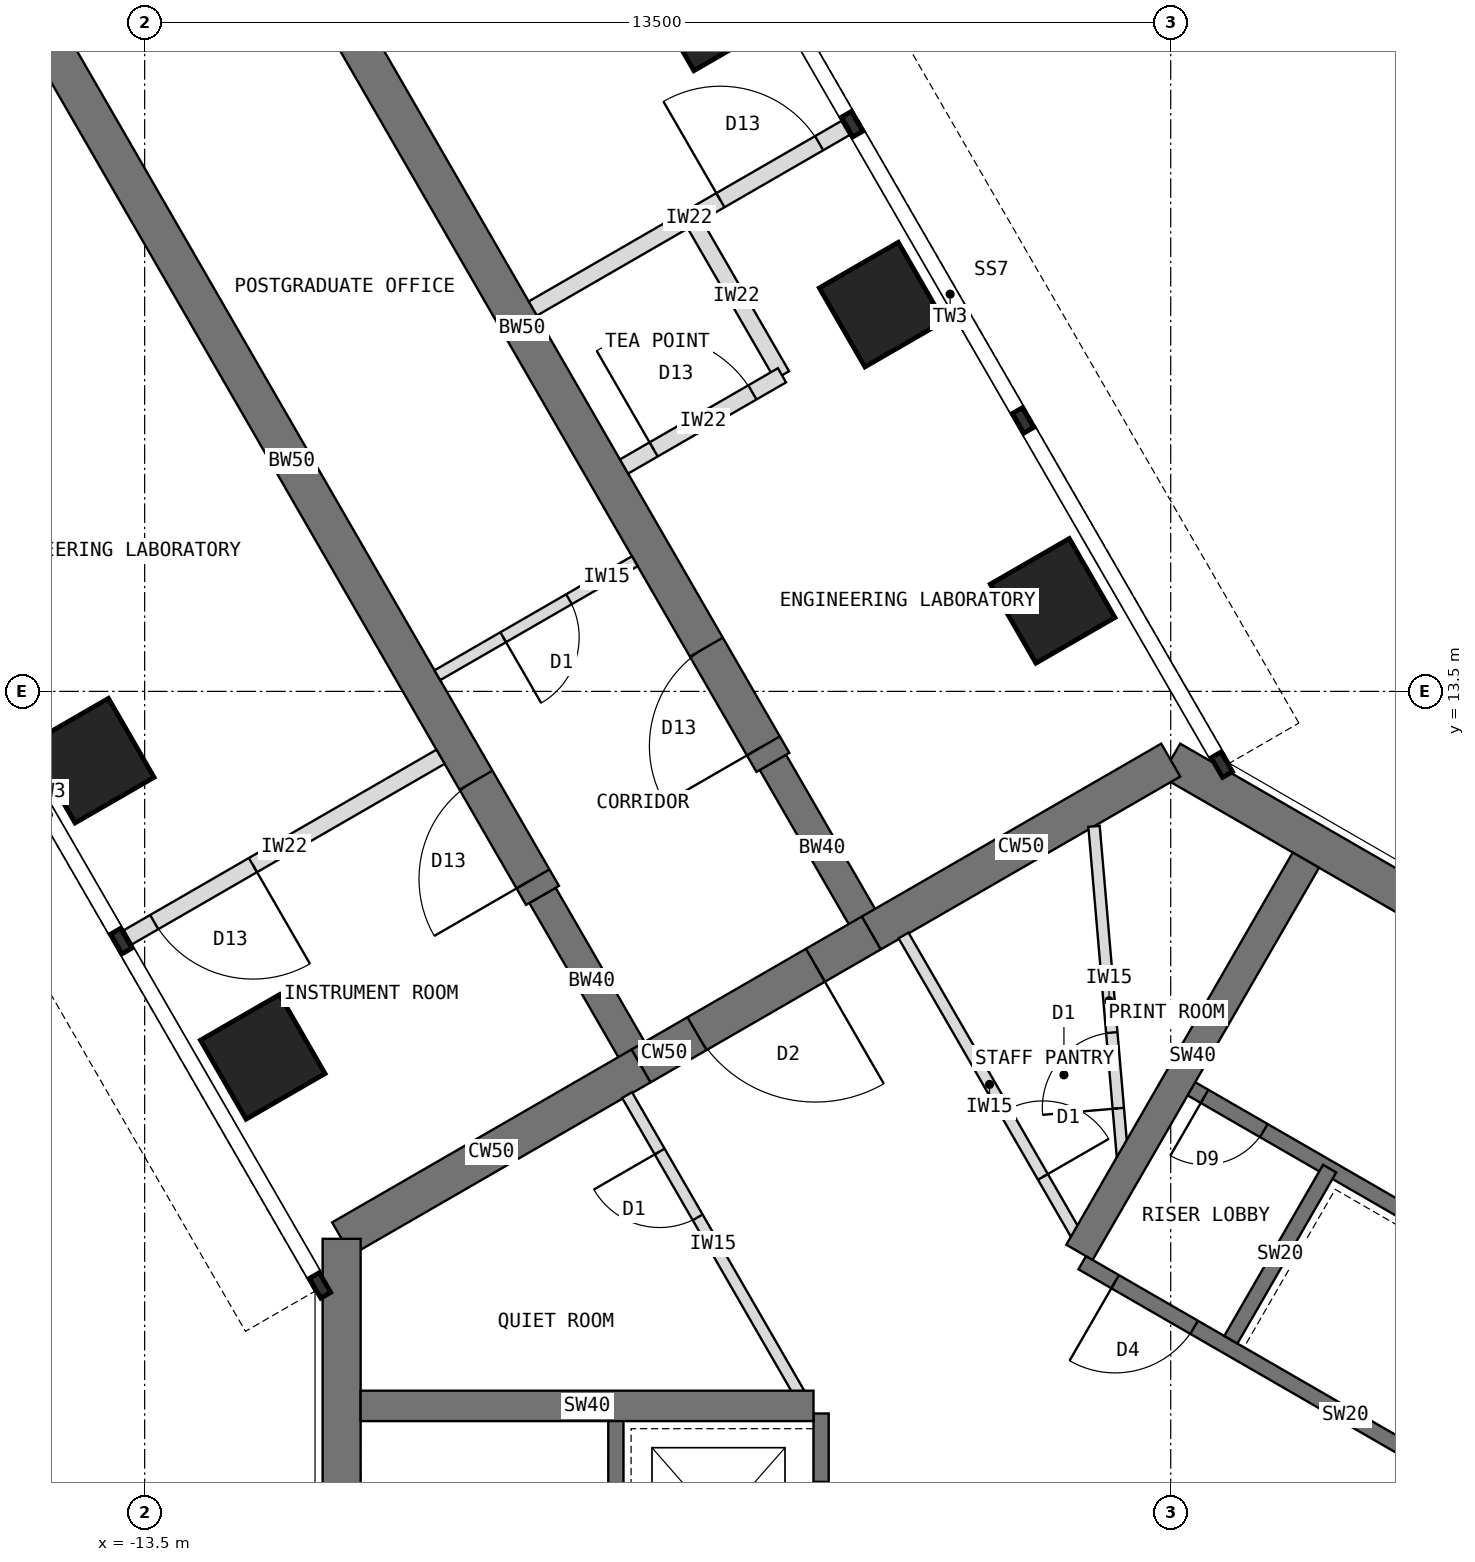
"""IFC4 building model, lengths in metres.
Left out: names, types, materials, properties, quantities, classifications, styles, units other than length and angle.
Written with IfcOpenShell. Run it as: python <this file> out.ifc"""

import sys

from ifc_helpers import new_model, si_unit, direction, frame, frame_2d, origin, origin_2d, place, context, subcontext, project, spatial, rectangle, extrude, element, fill, save


model = new_model("IFC4")
c1 = context("Model", 3, precision=1e-05, world=origin(), true_north=direction((0.0, 1.0)))
c2 = subcontext(c1, "Body", "Model", "MODEL_VIEW")
j1 = project(units=[si_unit("LENGTHUNIT", "METRE"), si_unit("PLANEANGLEUNIT", "RADIAN")], contexts=[c1])
p1 = place(None, origin())
s1 = spatial("IfcSite", under=j1, at=p1, CompositionType="ELEMENT")
p2 = place(p1, origin())
s2 = spatial("IfcBuilding", under=s1, at=p2, CompositionType="ELEMENT")
p3 = place(p2, frame((0.0, 0.0, 186.5)))
s3 = spatial("IfcBuildingStorey", under=s2, at=p3, CompositionType="ELEMENT", Elevation=186.5)
p4 = place(p3, frame((10.908, 6.298, 0.0), z_axis=(0.0, 0.0, 1.0), x_axis=(-0.866021940709, 0.500005998175, 0.0)))
e1 = element("IfcWall", 1, at=p4, inside=s3, PredefinedType="SHEAR", context=c2, shape_type="SweptSolid", body=[
    extrude(rectangle(XDim=12.596, YDim=0.5, at=frame_2d((6.298, 0.0))), origin(), (0.0, 0.0, 1.0), 4.0),
])
p5 = place(p3, frame((0.0, 12.596, 0.0), z_axis=(0.0, 0.0, 1.0), x_axis=(-0.866011268655, -0.500024481964, 0.0)))
e2 = element("IfcWall", 2, at=p5, inside=s3, PredefinedType="SHEAR", context=c2, shape_type="SweptSolid", body=[
    extrude(rectangle(XDim=4.548, YDim=0.5, at=frame_2d((2.274, 0.0))), origin(), (0.0, 0.0, 1.0), 4.0),
])
p6 = place(p3, frame((-3.939, 10.322, 0.0), z_axis=(0.0, 0.0, 1.0), x_axis=(-0.866019471182, -0.500010275428, 0.0)))
e3 = element("IfcWall", 3, at=p6, inside=s3, PredefinedType="SHEAR", context=c2, shape_type="SweptSolid", body=[
    extrude(rectangle(XDim=3.5, YDim=0.5, at=frame_2d((1.75, 0.0))), origin(), (0.0, 0.0, 1.0), 4.0),
])
p7 = place(p6, frame((0.85, 0.0, 0.0)))
e4 = element("IfcOpeningElement", 4, at=p7, cuts=e3, PredefinedType="OPENING", context=c2, shape_type="SweptSolid", body=[
    extrude(rectangle(XDim=1.8, YDim=2.1, at=frame_2d((0.9, 1.05))), frame((0.0, 0.26, 0.0), z_axis=(0.0, -1.0, 0.0), x_axis=(1.0, 0.0, 0.0)), (0.0, 0.0, 1.0), 0.52),
])
p8 = place(p3, frame((-6.97, 8.572, 0.0), z_axis=(0.0, 0.0, 1.0), x_axis=(-0.866034513004, -0.499984222037, 0.0)))
e5 = element("IfcWall", 5, at=p8, inside=s3, PredefinedType="SHEAR", context=c2, shape_type="SweptSolid", body=[
    extrude(rectangle(XDim=4.548, YDim=0.5, at=frame_2d((2.274, 0.0))), origin(), (0.0, 0.0, 1.0), 4.0),
])
p9 = place(p3, frame((-10.908, 6.298, 0.0), z_axis=(0.0, 0.0, 1.0), x_axis=(0.0, -1.0, 0.0)))
e6 = element("IfcWall", 6, at=p9, inside=s3, PredefinedType="SHEAR", context=c2, shape_type="SweptSolid", body=[
    extrude(rectangle(XDim=12.596, YDim=0.5, at=frame_2d((6.298, 0.0))), origin(), (0.0, 0.0, 1.0), 4.0),
])
p10 = place(p3, frame((-6.97, 8.572, 0.0), z_axis=(0.0, 0.0, 1.0), x_axis=(-0.499988811324, 0.866031863473, 0.0)))
e7 = element("IfcWall", 7, at=p10, inside=s3, PredefinedType="SHEAR", context=c2, shape_type="SweptSolid", body=[
    extrude(rectangle(XDim=2.592, YDim=0.4, at=frame_2d((1.296, 0.0))), origin(), (0.0, 0.0, 1.0), 4.0),
])
p11 = place(p3, frame((-8.266, 10.816, 0.0), z_axis=(0.0, 0.0, 1.0), x_axis=(-0.499996231654, 0.866027579429, 0.0)))
e8 = element("IfcWall", 8, at=p11, inside=s3, PredefinedType="SHEAR", context=c2, shape_type="SweptSolid", body=[
    extrude(rectangle(XDim=13.2, YDim=0.5, at=frame_2d((6.6, 0.0))), origin(), (0.0, 0.0, 1.0), 4.0),
])
p12 = place(p11, frame((0.25, 0.0, 0.0)))
e9 = element("IfcOpeningElement", 9, at=p12, cuts=e8, PredefinedType="OPENING", context=c2, shape_type="SweptSolid", body=[
    extrude(rectangle(XDim=1.5, YDim=2.1, at=frame_2d((0.75, 1.05))), frame((0.0, 0.26, 0.0), z_axis=(0.0, -1.0, 0.0), x_axis=(1.0, 0.0, 0.0)), (0.0, 0.0, 1.0), 0.52),
])
p13 = place(p3, frame((-3.939, 10.322, 0.0), z_axis=(0.0, 0.0, 1.0), x_axis=(-0.499918158782, 0.866072649678, 0.0)))
e10 = element("IfcWall", 10, at=p13, inside=s3, PredefinedType="SHEAR", context=c2, shape_type="SweptSolid", body=[
    extrude(rectangle(XDim=2.592, YDim=0.4, at=frame_2d((1.296, 0.0))), origin(), (0.0, 0.0, 1.0), 4.0),
])
p14 = place(p3, frame((-5.234, 12.566, 0.0), z_axis=(0.0, 0.0, 1.0), x_axis=(-0.500010103361, 0.866019570528, 0.0)))
e11 = element("IfcWall", 11, at=p14, inside=s3, PredefinedType="SHEAR", context=c2, shape_type="SweptSolid", body=[
    extrude(rectangle(XDim=13.2, YDim=0.5, at=frame_2d((6.6, 0.0))), origin(), (0.0, 0.0, 1.0), 4.0),
])
p15 = place(p14, frame((0.25, 0.0, 0.0)))
e12 = element("IfcOpeningElement", 12, at=p15, cuts=e11, PredefinedType="OPENING", context=c2, shape_type="SweptSolid", body=[
    extrude(rectangle(XDim=1.5, YDim=2.1, at=frame_2d((0.75, 1.05))), frame((0.0, 0.26, 0.0), z_axis=(0.0, -1.0, 0.0), x_axis=(1.0, 0.0, 0.0)), (0.0, 0.0, 1.0), 0.52),
])
for number, where, z_axis, x_axis in (
    (13, (-11.946, 8.691, 0.0), (0.0, 0.0, 1.0), (0.866, 0.5, 0.0)),
    (14, (-1.554, 14.691, 0.0), (0.0, 0.0, 1.0), (0.866, 0.5, 0.0)),
    (15, (-14.196, 12.588, 0.0), (0.0, 0.0, 1.0), (0.866, 0.5, 0.0)),
    (16, (-3.804, 18.588, 0.0), (0.0, 0.0, 1.0), (0.866, 0.5, 0.0)),
    (17, (-6.054, 22.486, 0.0), (0.0, 0.0, 1.0), (0.866, 0.5, 0.0)),
):
    element("IfcColumn", number, at=place(p3, frame(where, z_axis=z_axis, x_axis=x_axis)), inside=s3, PredefinedType="COLUMN", context=c2, shape_type="SweptSolid", body=[
        extrude(rectangle(XDim=1.2, YDim=1.2, at=origin_2d()), origin(), (0.0, 0.0, 1.0), 4.0),
    ])
p16 = place(p3, frame((5.764, 1.984, 0.0), z_axis=(0.0, 0.0, 1.0), x_axis=(-0.866026010844, 0.49999894854, 0.0)))
e18 = element("IfcWall", 18, at=p16, inside=s3, PredefinedType="SHEAR", context=c2, shape_type="SweptSolid", body=[
    extrude(rectangle(XDim=8.0, YDim=0.2, at=frame_2d((4.0, 0.0))), origin(), (0.0, 0.0, 1.0), 4.0),
])
p17 = place(p16, frame((6.3, 0.0, 0.0)))
e19 = element("IfcOpeningElement", 19, at=p17, cuts=e18, PredefinedType="OPENING", context=c2, shape_type="SweptSolid", body=[
    extrude(rectangle(XDim=1.2, YDim=2.1, at=frame_2d((0.6, 1.05))), frame((0.0, 0.11, 0.0), z_axis=(0.0, -1.0, 0.0), x_axis=(1.0, 0.0, 0.0)), (0.0, 0.0, 1.0), 0.22),
])
p18 = place(p3, frame((0.791, 4.97, 0.0), z_axis=(0.0, 0.0, 1.0), x_axis=(0.499936506574, 0.866062058628, 0.0)))
e20 = element("IfcWall", 20, at=p18, inside=s3, PredefinedType="SHEAR", context=c2, shape_type="SweptSolid", body=[
    extrude(rectangle(XDim=2.6, YDim=0.2, at=frame_2d((1.3, 0.0))), origin(), (0.0, 0.0, 1.0), 4.0),
])
p19 = place(p3, frame((7.114, 4.322, 0.0), z_axis=(0.0, 0.0, 1.0), x_axis=(-0.866026010844, 0.49999894854, 0.0)))
e21 = element("IfcWall", 21, at=p19, inside=s3, PredefinedType="SHEAR", context=c2, shape_type="SweptSolid", body=[
    extrude(rectangle(XDim=8.0, YDim=0.2, at=frame_2d((4.0, 0.0))), origin(), (0.0, 0.0, 1.0), 4.0),
])
p20 = place(p19, frame((6.8, 0.0, 0.0)))
e22 = element("IfcOpeningElement", 22, at=p20, cuts=e21, PredefinedType="OPENING", context=c2, shape_type="SweptSolid", body=[
    extrude(rectangle(XDim=0.9, YDim=2.1, at=frame_2d((0.45, 1.05))), frame((0.0, 0.11, 0.0), z_axis=(0.0, -1.0, 0.0), x_axis=(1.0, 0.0, 0.0)), (0.0, 0.0, 1.0), 0.22),
])
p21 = place(p3, frame((-1.201, 6.12, 0.0), z_axis=(0.0, 0.0, 1.0), x_axis=(0.500021575205, 0.866012946976, 0.0)))
e23 = element("IfcWall", 23, at=p21, inside=s3, PredefinedType="SHEAR", context=c2, shape_type="SweptSolid", body=[
    extrude(rectangle(XDim=5.958, YDim=0.4, at=frame_2d((2.979, 0.0))), origin(), (0.0, 0.0, 1.0), 4.0),
])
p22 = place(p3, frame((-4.6, 4.0, 0.0), z_axis=(0.0, 0.0, 1.0), x_axis=(0.0, -1.0, 0.0)))
e24 = element("IfcWall", 24, at=p22, inside=s3, PredefinedType="SHEAR", context=c2, shape_type="SweptSolid", body=[
    extrude(rectangle(XDim=8.0, YDim=0.2, at=frame_2d((4.0, 0.0))), origin(), (0.0, 0.0, 1.0), 4.0),
])
p23 = place(p22, frame((6.3, 0.0, 0.0)))
e25 = element("IfcOpeningElement", 25, at=p23, cuts=e24, PredefinedType="OPENING", context=c2, shape_type="SweptSolid", body=[
    extrude(rectangle(XDim=1.2, YDim=2.1, at=frame_2d((0.6, 1.05))), frame((0.0, 0.11, 0.0), z_axis=(0.0, -1.0, 0.0), x_axis=(1.0, 0.0, 0.0)), (0.0, 0.0, 1.0), 0.22),
])
p24 = place(p22, frame((0.9, 0.0, 0.0)))
e26 = element("IfcOpeningElement", 26, at=p24, cuts=e24, PredefinedType="OPENING", context=c2, shape_type="SweptSolid", body=[
    extrude(rectangle(XDim=1.1, YDim=2.2, at=frame_2d((0.55, 1.1))), frame((0.0, 0.11, 0.0), z_axis=(0.0, -1.0, 0.0), x_axis=(1.0, 0.0, 0.0)), (0.0, 0.0, 1.0), 0.22),
])
p25 = place(p3, frame((-7.3, 4.0, 0.0), z_axis=(0.0, 0.0, 1.0), x_axis=(0.0, -1.0, 0.0)))
e27 = element("IfcWall", 27, at=p25, inside=s3, PredefinedType="SHEAR", context=c2, shape_type="SweptSolid", body=[
    extrude(rectangle(XDim=8.0, YDim=0.2, at=frame_2d((4.0, 0.0))), origin(), (0.0, 0.0, 1.0), 4.0),
])
p26 = place(p25, frame((6.7, 0.0, 0.0)))
e28 = element("IfcOpeningElement", 28, at=p26, cuts=e27, PredefinedType="OPENING", context=c2, shape_type="SweptSolid", body=[
    extrude(rectangle(XDim=1.1, YDim=2.1, at=frame_2d((0.55, 1.05))), frame((0.0, 0.11, 0.0), z_axis=(0.0, -1.0, 0.0), x_axis=(1.0, 0.0, 0.0)), (0.0, 0.0, 1.0), 0.22),
])
p27 = place(p3, frame((-4.7, 4.1, 0.0), z_axis=(0.0, 0.0, 1.0), x_axis=(-1.0, 0.0, 0.0)))
e29 = element("IfcWall", 29, at=p27, inside=s3, PredefinedType="SHEAR", context=c2, shape_type="SweptSolid", body=[
    extrude(rectangle(XDim=5.958, YDim=0.4, at=frame_2d((2.979, 0.0))), origin(), (0.0, 0.0, 1.0), 4.0),
])
p28 = place(p3, frame((-9.607, 12.64, 0.0), z_axis=(0.0, 0.0, 1.0), x_axis=(-0.866033238375, -0.499986429846, 0.0)))
e30 = element("IfcWall", 30, at=p28, inside=s3, PredefinedType="PARTITIONING", context=c2, shape_type="SweptSolid", body=[
    extrude(rectangle(XDim=4.75, YDim=0.215, at=frame_2d((2.375, 0.0))), origin(), (0.0, 0.0, 1.0), 3.8),
])
p29 = place(p28, frame((2.85, 0.0, 0.0)))
e31 = element("IfcOpeningElement", 31, at=p29, cuts=e30, PredefinedType="OPENING", context=c2, shape_type="SweptSolid", body=[
    extrude(rectangle(XDim=1.5, YDim=2.1, at=frame_2d((0.75, 1.05))), frame((0.0, 0.117, 0.0), z_axis=(0.0, -1.0, 0.0), x_axis=(1.0, 0.0, 0.0)), (0.0, 0.0, 1.0), 0.235),
])
p30 = place(p3, frame((-8.393, 18.537, 0.0), z_axis=(0.0, 0.0, 1.0), x_axis=(0.866033238375, 0.499986429846, 0.0)))
e32 = element("IfcWall", 32, at=p30, inside=s3, PredefinedType="PARTITIONING", context=c2, shape_type="SweptSolid", body=[
    extrude(rectangle(XDim=4.75, YDim=0.215, at=frame_2d((2.375, 0.0))), origin(), (0.0, 0.0, 1.0), 3.8),
])
p31 = place(p30, frame((2.85, 0.0, 0.0)))
e33 = element("IfcOpeningElement", 33, at=p31, cuts=e32, PredefinedType="OPENING", context=c2, shape_type="SweptSolid", body=[
    extrude(rectangle(XDim=1.5, YDim=2.1, at=frame_2d((0.75, 1.05))), frame((0.0, 0.117, 0.0), z_axis=(0.0, -1.0, 0.0), x_axis=(1.0, 0.0, 0.0)), (0.0, 0.0, 1.0), 0.235),
])
p32 = place(p3, frame((-5.115, 17.658, 0.0), z_axis=(0.0, 0.0, 1.0), x_axis=(-0.499957262057, 0.866050077142, 0.0)))
e34 = element("IfcWall", 34, at=p32, inside=s3, PredefinedType="PARTITIONING", context=c2, shape_type="SweptSolid", body=[
    extrude(rectangle(XDim=2.4, YDim=0.215, at=frame_2d((1.2, 0.0))), origin(), (0.0, 0.0, 1.0), 3.8),
])
p33 = place(p3, frame((-7.193, 16.458, 0.0), z_axis=(0.0, 0.0, 1.0), x_axis=(0.866024647952, 0.500001309137, 0.0)))
e35 = element("IfcWall", 35, at=p33, inside=s3, PredefinedType="PARTITIONING", context=c2, shape_type="SweptSolid", body=[
    extrude(rectangle(XDim=2.4, YDim=0.215, at=frame_2d((1.2, 0.0))), origin(), (0.0, 0.0, 1.0), 3.8),
])
p34 = place(p33, frame((0.45, 0.0, 0.0)))
e36 = element("IfcOpeningElement", 36, at=p34, cuts=e35, PredefinedType="OPENING", context=c2, shape_type="SweptSolid", body=[
    extrude(rectangle(XDim=1.5, YDim=2.1, at=frame_2d((0.75, 1.05))), frame((0.0, 0.117, 0.0), z_axis=(0.0, -1.0, 0.0), x_axis=(1.0, 0.0, 0.0)), (0.0, 0.0, 1.0), 0.235),
])
p35 = place(p3, frame((-4.89, 4.27, 0.0), z_axis=(0.0, 0.0, 1.0), x_axis=(-0.500032211057, 0.866006805923, 0.0)))
e37 = element("IfcWall", 37, at=p35, inside=s3, PredefinedType="PARTITIONING", context=c2, shape_type="SweptSolid", body=[
    extrude(rectangle(XDim=4.526, YDim=0.15, at=frame_2d((2.263, 0.0))), origin(), (0.0, 0.0, 1.0), 3.8),
])
p36 = place(p35, frame((2.668, 0.0, 0.0)))
e38 = element("IfcOpeningElement", 38, at=p36, cuts=e37, PredefinedType="OPENING", context=c2, shape_type="SweptSolid", body=[
    extrude(rectangle(XDim=1.0, YDim=2.1, at=frame_2d((0.5, 1.05))), frame((0.0, 0.085, 0.0), z_axis=(0.0, -1.0, 0.0), x_axis=(1.0, 0.0, 0.0)), (0.0, 0.0, 1.0), 0.17),
])
p37 = place(p3, frame((-3.515, 10.289, 0.0), z_axis=(0.0, 0.0, 1.0), x_axis=(0.499968392031, -0.866043651885, 0.0)))
e39 = element("IfcWall", 39, at=p37, inside=s3, PredefinedType="PARTITIONING", context=c2, shape_type="SweptSolid", body=[
    extrude(rectangle(XDim=4.526, YDim=0.15, at=frame_2d((2.263, 0.0))), origin(), (0.0, 0.0, 1.0), 3.8),
])
p38 = place(p37, frame((2.668, 0.0, 0.0)))
e40 = element("IfcOpeningElement", 40, at=p38, cuts=e39, PredefinedType="OPENING", context=c2, shape_type="SweptSolid", body=[
    extrude(rectangle(XDim=1.0, YDim=2.1, at=frame_2d((0.5, 1.05))), frame((0.0, 0.085, 0.0), z_axis=(0.0, -1.0, 0.0), x_axis=(1.0, 0.0, 0.0)), (0.0, 0.0, 1.0), 0.17),
])
p39 = place(p3, frame((-0.614, 7.136, 0.0), z_axis=(0.0, 0.0, 1.0), x_axis=(-0.085774026317, 0.996314617181, 0.0)))
e41 = element("IfcWall", 41, at=p39, inside=s3, PredefinedType="PARTITIONING", context=c2, shape_type="SweptSolid", body=[
    extrude(rectangle(XDim=4.605, YDim=0.15, at=frame_2d((2.303, 0.0))), origin(), (0.0, 0.0, 1.0), 3.8),
])
p40 = place(p39, frame((0.882, 0.0, 0.0)))
e42 = element("IfcOpeningElement", 42, at=p40, cuts=e41, PredefinedType="OPENING", context=c2, shape_type="SweptSolid", body=[
    extrude(rectangle(XDim=1.0, YDim=2.1, at=frame_2d((0.5, 1.05))), frame((0.0, 0.085, 0.0), z_axis=(0.0, -1.0, 0.0), x_axis=(1.0, 0.0, 0.0)), (0.0, 0.0, 1.0), 0.17),
])
p41 = place(p3, frame((-7.051, 15.213, 0.0), z_axis=(0.0, 0.0, 1.0), x_axis=(-0.866010750942, -0.50002537861, 0.0)))
e43 = element("IfcWall", 43, at=p41, inside=s3, PredefinedType="PARTITIONING", context=c2, shape_type="SweptSolid", body=[
    extrude(rectangle(XDim=3.0, YDim=0.15, at=frame_2d((1.5, 0.0))), origin(), (0.0, 0.0, 1.0), 3.8),
])
p42 = place(p41, frame((1.0, 0.0, 0.0)))
e44 = element("IfcOpeningElement", 44, at=p42, cuts=e43, PredefinedType="OPENING", context=c2, shape_type="SweptSolid", body=[
    extrude(rectangle(XDim=1.0, YDim=2.1, at=frame_2d((0.5, 1.05))), frame((0.0, 0.085, 0.0), z_axis=(0.0, -1.0, 0.0), x_axis=(1.0, 0.0, 0.0)), (0.0, 0.0, 1.0), 0.17),
])
p43 = place(p17, origin())
e45 = element("IfcDoor", 45, at=p43, inside=s3, OperationType="SINGLE_SWING_RIGHT", PredefinedType="DOOR", context=c2, shape_type="SweptSolid", body=[
    extrude(rectangle(XDim=1.2, YDim=2.1, at=frame_2d((0.6, 1.05))), frame((0.0, 0.025, 0.0), z_axis=(0.0, -1.0, 0.0), x_axis=(1.0, 0.0, 0.0)), (0.0, 0.0, 1.0), 0.05),
])
fill(e19, e45)
p44 = place(p20, origin())
e46 = element("IfcDoor", 46, at=p44, inside=s3, OperationType="SINGLE_SWING_RIGHT", PredefinedType="DOOR", context=c2, shape_type="SweptSolid", body=[
    extrude(rectangle(XDim=0.9, YDim=2.1, at=frame_2d((0.45, 1.05))), frame((0.0, 0.025, 0.0), z_axis=(0.0, -1.0, 0.0), x_axis=(1.0, 0.0, 0.0)), (0.0, 0.0, 1.0), 0.05),
])
fill(e22, e46)
p45 = place(p7, origin())
e47 = element("IfcDoor", 47, at=p45, inside=s3, OperationType="DOUBLE_DOOR_DOUBLE_SWING", PredefinedType="DOOR", context=c2, shape_type="SweptSolid", body=[
    extrude(rectangle(XDim=1.8, YDim=2.1, at=frame_2d((0.9, 1.05))), frame((0.0, 0.025, 0.0), z_axis=(0.0, -1.0, 0.0), x_axis=(1.0, 0.0, 0.0)), (0.0, 0.0, 1.0), 0.05),
])
fill(e4, e47)
p46 = place(p29, origin())
e48 = element("IfcDoor", 48, at=p46, inside=s3, OperationType="DOUBLE_DOOR_SINGLE_SWING", PredefinedType="DOOR", context=c2, shape_type="SweptSolid", body=[
    extrude(rectangle(XDim=1.5, YDim=2.1, at=frame_2d((0.75, 1.05))), frame((0.0, 0.025, 0.0), z_axis=(0.0, -1.0, 0.0), x_axis=(1.0, 0.0, 0.0)), (0.0, 0.0, 1.0), 0.05),
])
fill(e31, e48)
p47 = place(p31, origin())
e49 = element("IfcDoor", 49, at=p47, inside=s3, OperationType="DOUBLE_DOOR_SINGLE_SWING", PredefinedType="DOOR", context=c2, shape_type="SweptSolid", body=[
    extrude(rectangle(XDim=1.5, YDim=2.1, at=frame_2d((0.75, 1.05))), frame((0.0, 0.025, 0.0), z_axis=(0.0, -1.0, 0.0), x_axis=(1.0, 0.0, 0.0)), (0.0, 0.0, 1.0), 0.05),
])
fill(e33, e49)
p48 = place(p34, origin())
e50 = element("IfcDoor", 50, at=p48, inside=s3, OperationType="DOUBLE_DOOR_SINGLE_SWING", PredefinedType="DOOR", context=c2, shape_type="SweptSolid", body=[
    extrude(rectangle(XDim=1.5, YDim=2.1, at=frame_2d((0.75, 1.05))), frame((0.0, 0.025, 0.0), z_axis=(0.0, -1.0, 0.0), x_axis=(1.0, 0.0, 0.0)), (0.0, 0.0, 1.0), 0.05),
])
fill(e36, e50)
p49 = place(p38, origin())
e51 = element("IfcDoor", 51, at=p49, inside=s3, OperationType="SINGLE_SWING_RIGHT", PredefinedType="DOOR", context=c2, shape_type="SweptSolid", body=[
    extrude(rectangle(XDim=1.0, YDim=2.1, at=frame_2d((0.5, 1.05))), frame((0.0, 0.025, 0.0), z_axis=(0.0, -1.0, 0.0), x_axis=(1.0, 0.0, 0.0)), (0.0, 0.0, 1.0), 0.05),
])
fill(e40, e51)
p50 = place(p40, origin())
e52 = element("IfcDoor", 52, at=p50, inside=s3, OperationType="SINGLE_SWING_LEFT", PredefinedType="DOOR", context=c2, shape_type="SweptSolid", body=[
    extrude(rectangle(XDim=1.0, YDim=2.1, at=frame_2d((0.5, 1.05))), frame((0.0, 0.025, 0.0), z_axis=(0.0, -1.0, 0.0), x_axis=(1.0, 0.0, 0.0)), (0.0, 0.0, 1.0), 0.05),
])
fill(e42, e52)
p51 = place(p36, origin())
e53 = element("IfcDoor", 53, at=p51, inside=s3, OperationType="SINGLE_SWING_RIGHT", PredefinedType="DOOR", context=c2, shape_type="SweptSolid", body=[
    extrude(rectangle(XDim=1.0, YDim=2.1, at=frame_2d((0.5, 1.05))), frame((0.0, 0.025, 0.0), z_axis=(0.0, -1.0, 0.0), x_axis=(1.0, 0.0, 0.0)), (0.0, 0.0, 1.0), 0.05),
])
fill(e38, e53)
p52 = place(p42, origin())
e54 = element("IfcDoor", 54, at=p52, inside=s3, OperationType="SINGLE_SWING_RIGHT", PredefinedType="DOOR", context=c2, shape_type="SweptSolid", body=[
    extrude(rectangle(XDim=1.0, YDim=2.1, at=frame_2d((0.5, 1.05))), frame((0.0, 0.025, 0.0), z_axis=(0.0, -1.0, 0.0), x_axis=(1.0, 0.0, 0.0)), (0.0, 0.0, 1.0), 0.05),
])
fill(e44, e54)
p53 = place(p12, origin())
e55 = element("IfcDoor", 55, at=p53, inside=s3, OperationType="DOUBLE_DOOR_SINGLE_SWING", PredefinedType="DOOR", context=c2, shape_type="SweptSolid", body=[
    extrude(rectangle(XDim=1.5, YDim=2.1, at=frame_2d((0.75, 1.05))), frame((0.0, 0.025, 0.0), z_axis=(0.0, -1.0, 0.0), x_axis=(1.0, 0.0, 0.0)), (0.0, 0.0, 1.0), 0.05),
])
fill(e9, e55)
p54 = place(p15, origin())
e56 = element("IfcDoor", 56, at=p54, inside=s3, OperationType="DOUBLE_DOOR_SINGLE_SWING", PredefinedType="DOOR", context=c2, shape_type="SweptSolid", body=[
    extrude(rectangle(XDim=1.5, YDim=2.1, at=frame_2d((0.75, 1.05))), frame((0.0, 0.025, 0.0), z_axis=(0.0, -1.0, 0.0), x_axis=(1.0, 0.0, 0.0)), (0.0, 0.0, 1.0), 0.05),
])
fill(e12, e56)
save(model, sys.argv[1])
